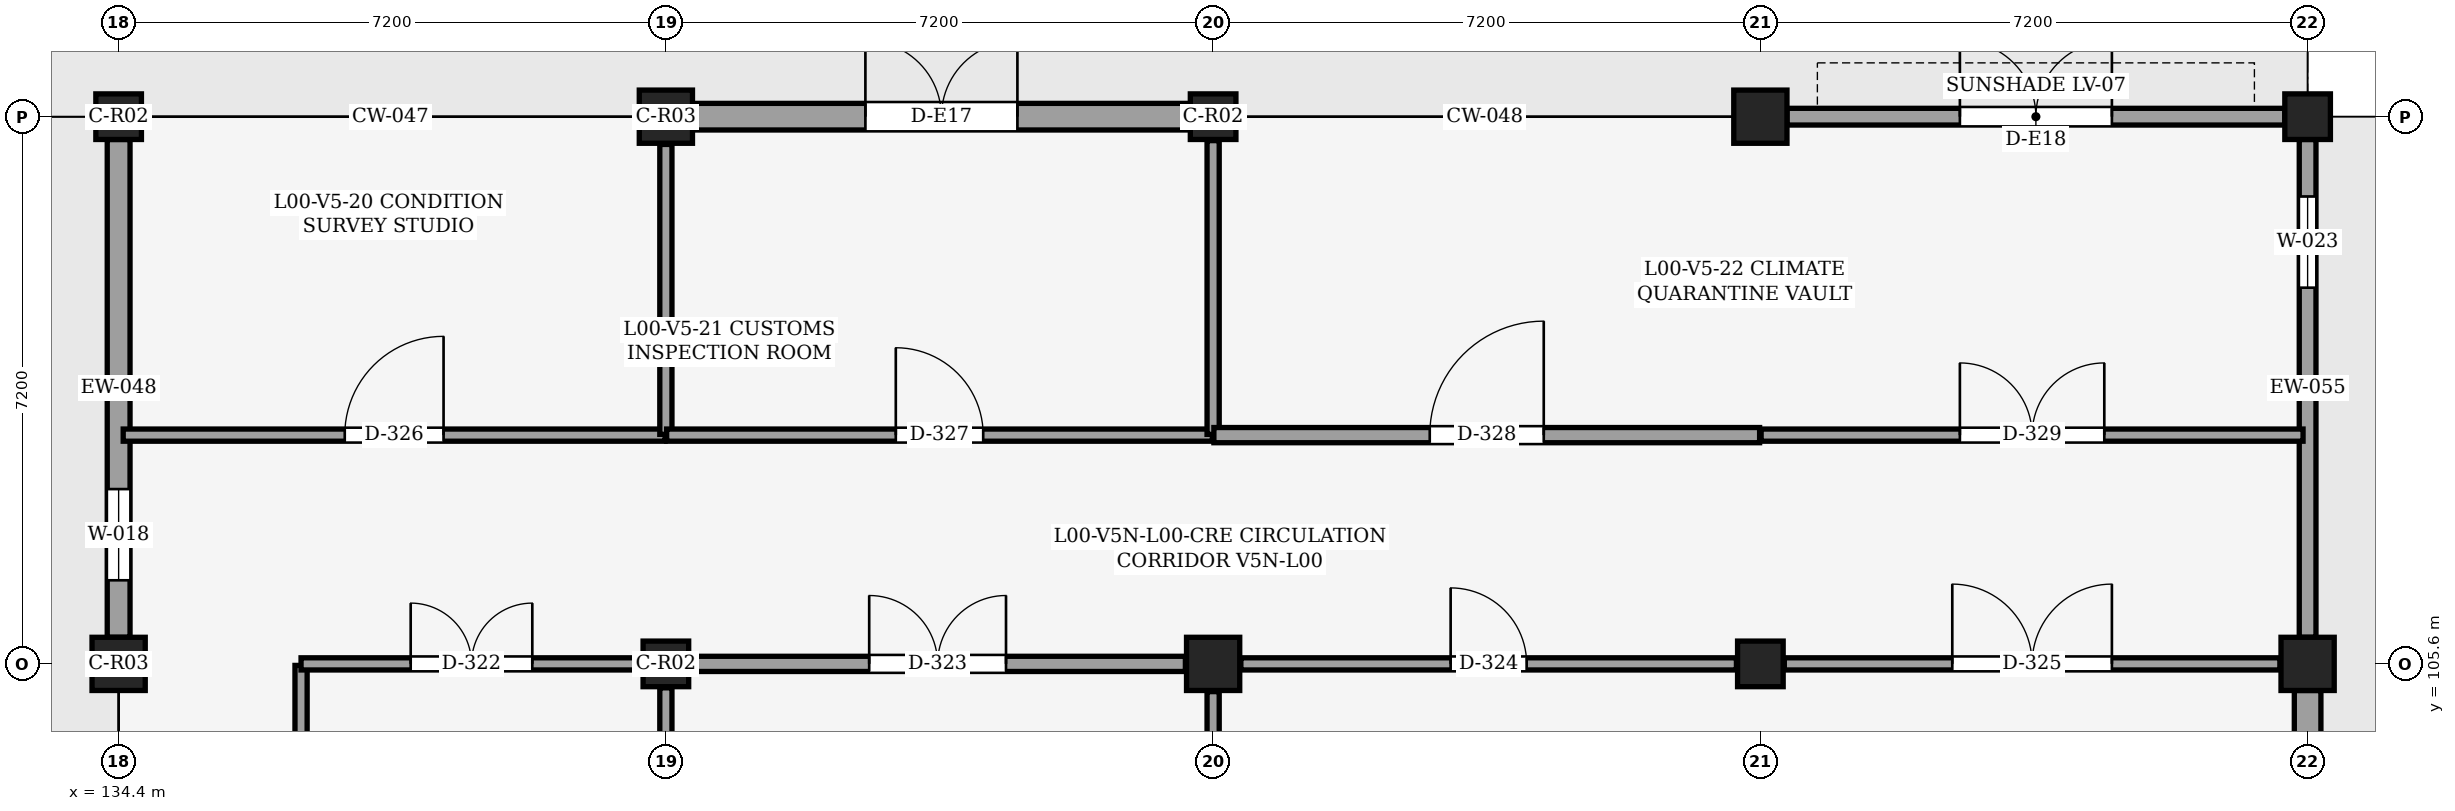
"""IFC4 building model, lengths in metres.
Left out: names, types, materials, properties, quantities, classifications, styles, units other than length and angle.
Written with IfcOpenShell. Run it as: python <this file> out.ifc"""

import sys

from ifc_helpers import new_model, si_unit, direction, frame, frame_2d, origin, origin_2d, place, context, subcontext, project, spatial, rectangle, extrude, element, fill, save


model = new_model("IFC4")
c1 = context("Model", 3, precision=1e-05, world=origin(), true_north=direction((0.0, 1.0)))
c2 = subcontext(c1, "Body", "Model", "MODEL_VIEW")
j1 = project(units=[si_unit("LENGTHUNIT", "METRE"), si_unit("PLANEANGLEUNIT", "RADIAN")], contexts=[c1])
p1 = place(None, origin())
s1 = spatial("IfcSite", under=j1, at=p1, CompositionType="ELEMENT")
p2 = place(p1, origin())
s2 = spatial("IfcBuilding", under=s1, at=p2, CompositionType="ELEMENT")
p3 = place(p2, origin())
s3 = spatial("IfcBuildingStorey", under=s2, at=p3, CompositionType="ELEMENT", Elevation=0.0)
p4 = place(p3, frame((134.4, 105.6, 0.0), z_axis=(0.0, 0.0, 1.0), x_axis=(1.0, 0.0, 0.0)))
e1 = element("IfcColumn", 1, at=p4, inside=s3, PredefinedType="COLUMN", context=c2, shape_type="SweptSolid", body=[
    extrude(rectangle(XDim=0.7, YDim=0.7, at=origin_2d()), origin(), (0.0, 0.0, 1.0), 5.4),
])
for number, where, z_axis, x_axis in (
    (2, (134.4, 112.8, 0.0), (0.0, 0.0, 1.0), (1.0, 0.0, 0.0)),
    (3, (141.6, 105.6, 0.0), (0.0, 0.0, 1.0), (1.0, 0.0, 0.0)),
):
    element("IfcColumn", number, at=place(p3, frame(where, z_axis=z_axis, x_axis=x_axis)), inside=s3, PredefinedType="COLUMN", context=c2, shape_type="SweptSolid", body=[
        extrude(rectangle(XDim=0.6, YDim=0.6, at=origin_2d()), origin(), (0.0, 0.0, 1.0), 5.4),
    ])
for number, where, z_axis, x_axis in (
    (4, (141.6, 112.8, 0.0), (0.0, 0.0, 1.0), (1.0, 0.0, 0.0)),
    (5, (148.8, 105.6, 0.0), (0.0, 0.0, 1.0), (1.0, 0.0, 0.0)),
):
    element("IfcColumn", number, at=place(p3, frame(where, z_axis=z_axis, x_axis=x_axis)), inside=s3, PredefinedType="COLUMN", context=c2, shape_type="SweptSolid", body=[
        extrude(rectangle(XDim=0.7, YDim=0.7, at=origin_2d()), origin(), (0.0, 0.0, 1.0), 5.4),
    ])
for number, where, z_axis, x_axis in (
    (6, (148.8, 112.8, 0.0), (0.0, 0.0, 1.0), (1.0, 0.0, 0.0)),
    (7, (156.0, 105.6, 0.0), (0.0, 0.0, 1.0), (1.0, 0.0, 0.0)),
):
    element("IfcColumn", number, at=place(p3, frame(where, z_axis=z_axis, x_axis=x_axis)), inside=s3, PredefinedType="COLUMN", context=c2, shape_type="SweptSolid", body=[
        extrude(rectangle(XDim=0.6, YDim=0.6, at=origin_2d()), origin(), (0.0, 0.0, 1.0), 5.4),
    ])
for number, where, z_axis, x_axis in (
    (8, (156.0, 112.8, 0.0), (0.0, 0.0, 1.0), (1.0, 0.0, 0.0)),
    (9, (163.2, 105.6, 0.0), (0.0, 0.0, 1.0), (1.0, 0.0, 0.0)),
):
    element("IfcColumn", number, at=place(p3, frame(where, z_axis=z_axis, x_axis=x_axis)), inside=s3, PredefinedType="COLUMN", context=c2, shape_type="SweptSolid", body=[
        extrude(rectangle(XDim=0.7, YDim=0.7, at=origin_2d()), origin(), (0.0, 0.0, 1.0), 5.4),
    ])
p5 = place(p3, frame((163.2, 112.8, 0.0), z_axis=(0.0, 0.0, 1.0), x_axis=(1.0, 0.0, 0.0)))
e10 = element("IfcColumn", 10, at=p5, inside=s3, PredefinedType="COLUMN", context=c2, shape_type="SweptSolid", body=[
    extrude(rectangle(XDim=0.6, YDim=0.6, at=origin_2d()), origin(), (0.0, 0.0, 1.0), 5.4),
])
p6 = place(p3, frame((141.95, 112.8, 0.0), z_axis=(0.0, 0.0, 1.0), x_axis=(1.0, 0.0, 0.0)))
e11 = element("IfcWall", 11, at=p6, inside=s3, PredefinedType="SOLIDWALL", context=c2, shape_type="SweptSolid", body=[
    extrude(rectangle(XDim=6.55, YDim=0.35, at=frame_2d((3.275, 0.0))), origin(), (0.0, 0.0, 1.0), 4.678),
])
p7 = place(p6, frame((2.275, 0.0, 0.0)))
e12 = element("IfcOpeningElement", 12, at=p7, cuts=e11, PredefinedType="OPENING", context=c2, shape_type="SweptSolid", body=[
    extrude(rectangle(XDim=2.0, YDim=2.25, at=frame_2d((1.0, 1.125))), frame((0.0, 0.185, 0.0), z_axis=(0.0, -1.0, 0.0), x_axis=(1.0, 0.0, 0.0)), (0.0, 0.0, 1.0), 0.371),
])
p8 = place(p3, frame((156.35, 112.8, 0.0), z_axis=(0.0, 0.0, 1.0), x_axis=(1.0, 0.0, 0.0)))
e13 = element("IfcWall", 13, at=p8, inside=s3, PredefinedType="SOLIDWALL", context=c2, shape_type="SweptSolid", body=[
    extrude(rectangle(XDim=6.55, YDim=0.22, at=frame_2d((3.275, 0.0))), origin(), (0.0, 0.0, 1.0), 4.591),
])
p9 = place(p8, frame((2.275, 0.0, 0.0)))
e14 = element("IfcOpeningElement", 14, at=p9, cuts=e13, PredefinedType="OPENING", context=c2, shape_type="SweptSolid", body=[
    extrude(rectangle(XDim=2.0, YDim=2.25, at=frame_2d((1.0, 1.125))), frame((0.0, 0.12, 0.0), z_axis=(0.0, -1.0, 0.0), x_axis=(1.0, 0.0, 0.0)), (0.0, 0.0, 1.0), 0.24),
])
p10 = place(p3, frame((134.4, 105.95, 0.0), z_axis=(0.0, 0.0, 1.0), x_axis=(0.0, 1.0, 0.0)))
e15 = element("IfcWall", 15, at=p10, inside=s3, PredefinedType="SOLIDWALL", context=c2, shape_type="SweptSolid", body=[
    extrude(rectangle(XDim=6.55, YDim=0.3, at=frame_2d((3.275, 0.0))), origin(), (0.0, 0.0, 1.0), 4.54),
])
p11 = place(p10, frame((0.75, 0.0, 0.9)))
e16 = element("IfcOpeningElement", 16, at=p11, cuts=e15, PredefinedType="OPENING", context=c2, shape_type="SweptSolid", body=[
    extrude(rectangle(XDim=1.2, YDim=1.5, at=frame_2d((0.6, 0.75))), frame((0.0, 0.16, 0.0), z_axis=(0.0, -1.0, 0.0), x_axis=(1.0, 0.0, 0.0)), (0.0, 0.0, 1.0), 0.321),
])
p12 = place(p3, frame((163.2, 105.25, 0.0), z_axis=(0.0, 0.0, 1.0), x_axis=(0.0, -1.0, 0.0)))
e17 = element("IfcWall", 17, at=p12, inside=s3, PredefinedType="SOLIDWALL", context=c2, shape_type="SweptSolid", body=[
    extrude(rectangle(XDim=6.55, YDim=0.35, at=frame_2d((3.275, 0.0))), origin(), (0.0, 0.0, 1.0), 4.54),
])
p13 = place(p12, frame((0.75, 0.0, 0.9)))
e18 = element("IfcOpeningElement", 18, at=p13, cuts=e17, PredefinedType="OPENING", context=c2, shape_type="SweptSolid", body=[
    extrude(rectangle(XDim=1.2, YDim=1.5, at=frame_2d((0.6, 0.75))), frame((0.0, 0.185, 0.0), z_axis=(0.0, -1.0, 0.0), x_axis=(1.0, 0.0, 0.0)), (0.0, 0.0, 1.0), 0.371),
])
p14 = place(p3, frame((163.2, 112.5, 0.0), z_axis=(0.0, 0.0, 1.0), x_axis=(0.0, -1.0, 0.0)))
e19 = element("IfcWall", 19, at=p14, inside=s3, PredefinedType="SOLIDWALL", context=c2, shape_type="SweptSolid", body=[
    extrude(rectangle(XDim=6.55, YDim=0.22, at=frame_2d((3.275, 0.0))), origin(), (0.0, 0.0, 1.0), 4.54),
])
p15 = place(p14, frame((0.75, 0.0, 0.9)))
e20 = element("IfcOpeningElement", 20, at=p15, cuts=e19, PredefinedType="OPENING", context=c2, shape_type="SweptSolid", body=[
    extrude(rectangle(XDim=1.2, YDim=1.5, at=frame_2d((0.6, 0.75))), frame((0.0, 0.12, 0.0), z_axis=(0.0, -1.0, 0.0), x_axis=(1.0, 0.0, 0.0)), (0.0, 0.0, 1.0), 0.24),
])
p16 = place(p3, frame((136.8, 98.44, 0.0), z_axis=(0.0, 0.0, 1.0), x_axis=(0.0, 1.0, 0.0)))
e21 = element("IfcWall", 21, at=p16, inside=s3, PredefinedType="PARTITIONING", context=c2, shape_type="SweptSolid", body=[
    extrude(rectangle(XDim=7.14, YDim=0.16, at=frame_2d((3.57, 0.0))), origin(), (0.0, 0.0, 1.0), 5.14),
])
p17 = place(p3, frame((136.8, 105.6, 0.0), z_axis=(0.0, 0.0, 1.0), x_axis=(1.0, 0.0, 0.0)))
e22 = element("IfcWall", 22, at=p17, inside=s3, PredefinedType="PARTITIONING", context=c2, shape_type="SweptSolid", body=[
    extrude(rectangle(XDim=4.485, YDim=0.16, at=frame_2d((2.242, 0.0))), origin(), (0.0, 0.0, 1.0), 4.591),
])
p18 = place(p17, frame((1.442, 0.0, 0.0)))
e23 = element("IfcOpeningElement", 23, at=p18, cuts=e22, PredefinedType="OPENING", context=c2, shape_type="SweptSolid", body=[
    extrude(rectangle(XDim=1.6, YDim=2.35, at=frame_2d((0.8, 1.175))), frame((0.0, 0.09, 0.0), z_axis=(0.0, -1.0, 0.0), x_axis=(1.0, 0.0, 0.0)), (0.0, 0.0, 1.0), 0.18),
])
p19 = place(p3, frame((141.6, 98.715, 0.0), z_axis=(0.0, 0.0, 1.0), x_axis=(0.0, 1.0, 0.0)))
e24 = element("IfcWall", 24, at=p19, inside=s3, PredefinedType="PARTITIONING", context=c2, shape_type="SweptSolid", body=[
    extrude(rectangle(XDim=6.57, YDim=0.16, at=frame_2d((3.285, 0.0))), origin(), (0.0, 0.0, 1.0), 4.48),
])
p20 = place(p3, frame((141.915, 105.6, 0.0), z_axis=(0.0, 0.0, 1.0), x_axis=(1.0, 0.0, 0.0)))
e25 = element("IfcWall", 25, at=p20, inside=s3, PredefinedType="PARTITIONING", context=c2, shape_type="SweptSolid", body=[
    extrude(rectangle(XDim=6.52, YDim=0.2, at=frame_2d((3.26, 0.0))), origin(), (0.0, 0.0, 1.0), 4.607),
])
p21 = place(p20, frame((2.36, 0.0, 0.0)))
e26 = element("IfcOpeningElement", 26, at=p21, cuts=e25, PredefinedType="OPENING", context=c2, shape_type="SweptSolid", body=[
    extrude(rectangle(XDim=1.8, YDim=2.4, at=frame_2d((0.9, 1.2))), frame((0.0, 0.11, 0.0), z_axis=(0.0, -1.0, 0.0), x_axis=(1.0, 0.0, 0.0)), (0.0, 0.0, 1.0), 0.22),
])
p22 = place(p3, frame((148.8, 98.765, 0.0), z_axis=(0.0, 0.0, 1.0), x_axis=(0.0, 1.0, 0.0)))
e27 = element("IfcWall", 27, at=p22, inside=s3, PredefinedType="PARTITIONING", context=c2, shape_type="SweptSolid", body=[
    extrude(rectangle(XDim=6.47, YDim=0.16, at=frame_2d((3.235, 0.0))), origin(), (0.0, 0.0, 1.0), 4.38),
])
p23 = place(p3, frame((149.165, 105.6, 0.0), z_axis=(0.0, 0.0, 1.0), x_axis=(1.0, 0.0, 0.0)))
e28 = element("IfcWall", 28, at=p23, inside=s3, PredefinedType="PARTITIONING", context=c2, shape_type="SweptSolid", body=[
    extrude(rectangle(XDim=6.52, YDim=0.16, at=frame_2d((3.26, 0.0))), origin(), (0.0, 0.0, 1.0), 4.678),
])
p24 = place(p23, frame((2.76, 0.0, 0.0)))
e29 = element("IfcOpeningElement", 29, at=p24, cuts=e28, PredefinedType="OPENING", context=c2, shape_type="SweptSolid", body=[
    extrude(rectangle(XDim=1.0, YDim=2.15, at=frame_2d((0.5, 1.075))), frame((0.0, 0.09, 0.0), z_axis=(0.0, -1.0, 0.0), x_axis=(1.0, 0.0, 0.0)), (0.0, 0.0, 1.0), 0.18),
])
p25 = place(p3, frame((156.315, 105.6, 0.0), z_axis=(0.0, 0.0, 1.0), x_axis=(1.0, 0.0, 0.0)))
e30 = element("IfcWall", 30, at=p25, inside=s3, PredefinedType="PARTITIONING", context=c2, shape_type="SweptSolid", body=[
    extrude(rectangle(XDim=6.52, YDim=0.16, at=frame_2d((3.26, 0.0))), origin(), (0.0, 0.0, 1.0), 4.533),
])
p26 = place(p25, frame((2.21, 0.0, 0.0)))
e31 = element("IfcOpeningElement", 31, at=p26, cuts=e30, PredefinedType="OPENING", context=c2, shape_type="SweptSolid", body=[
    extrude(rectangle(XDim=2.1, YDim=2.5, at=frame_2d((1.05, 1.25))), frame((0.0, 0.09, 0.0), z_axis=(0.0, -1.0, 0.0), x_axis=(1.0, 0.0, 0.0)), (0.0, 0.0, 1.0), 0.18),
])
p27 = place(p3, frame((134.46, 108.61, 0.0), z_axis=(0.0, 0.0, 1.0), x_axis=(1.0, 0.0, 0.0)))
e32 = element("IfcWall", 32, at=p27, inside=s3, PredefinedType="PARTITIONING", context=c2, shape_type="SweptSolid", body=[
    extrude(rectangle(XDim=7.13, YDim=0.16, at=frame_2d((3.565, 0.0))), origin(), (0.0, 0.0, 1.0), 5.14),
])
p28 = place(p27, frame((2.915, 0.0, 0.0)))
e33 = element("IfcOpeningElement", 33, at=p28, cuts=e32, PredefinedType="OPENING", context=c2, shape_type="SweptSolid", body=[
    extrude(rectangle(XDim=1.3, YDim=2.2, at=frame_2d((0.65, 1.1))), frame((0.0, 0.09, 0.0), z_axis=(0.0, -1.0, 0.0), x_axis=(1.0, 0.0, 0.0)), (0.0, 0.0, 1.0), 0.18),
])
p29 = place(p3, frame((141.6, 108.62, 0.0), z_axis=(0.0, 0.0, 1.0), x_axis=(0.0, 1.0, 0.0)))
e34 = element("IfcWall", 34, at=p29, inside=s3, PredefinedType="PARTITIONING", context=c2, shape_type="SweptSolid", body=[
    extrude(rectangle(XDim=3.815, YDim=0.16, at=frame_2d((1.907, 0.0))), origin(), (0.0, 0.0, 1.0), 4.44),
])
p30 = place(p3, frame((141.61, 108.61, 0.0), z_axis=(0.0, 0.0, 1.0), x_axis=(1.0, 0.0, 0.0)))
e35 = element("IfcWall", 35, at=p30, inside=s3, PredefinedType="PARTITIONING", context=c2, shape_type="SweptSolid", body=[
    extrude(rectangle(XDim=7.18, YDim=0.16, at=frame_2d((3.59, 0.0))), origin(), (0.0, 0.0, 1.0), 5.14),
])
p31 = place(p30, frame((3.015, 0.0, 0.0)))
e36 = element("IfcOpeningElement", 36, at=p31, cuts=e35, PredefinedType="OPENING", context=c2, shape_type="SweptSolid", body=[
    extrude(rectangle(XDim=1.15, YDim=2.2, at=frame_2d((0.575, 1.1))), frame((0.0, 0.09, 0.0), z_axis=(0.0, -1.0, 0.0), x_axis=(1.0, 0.0, 0.0)), (0.0, 0.0, 1.0), 0.18),
])
p32 = place(p3, frame((148.8, 108.62, 0.0), z_axis=(0.0, 0.0, 1.0), x_axis=(0.0, 1.0, 0.0)))
e37 = element("IfcWall", 37, at=p32, inside=s3, PredefinedType="PARTITIONING", context=c2, shape_type="SweptSolid", body=[
    extrude(rectangle(XDim=3.865, YDim=0.16, at=frame_2d((1.933, 0.0))), origin(), (0.0, 0.0, 1.0), 4.29),
])
p33 = place(p3, frame((148.81, 108.61, 0.0), z_axis=(0.0, 0.0, 1.0), x_axis=(1.0, 0.0, 0.0)))
e38 = element("IfcWall", 38, at=p33, inside=s3, PredefinedType="PARTITIONING", context=c2, shape_type="SweptSolid", body=[
    extrude(rectangle(XDim=7.18, YDim=0.2, at=frame_2d((3.59, 0.0))), origin(), (0.0, 0.0, 1.0), 5.14),
])
p34 = place(p33, frame((2.84, 0.0, 0.0)))
e39 = element("IfcOpeningElement", 39, at=p34, cuts=e38, PredefinedType="OPENING", context=c2, shape_type="SweptSolid", body=[
    extrude(rectangle(XDim=1.5, YDim=2.2, at=frame_2d((0.75, 1.1))), frame((0.0, 0.11, 0.0), z_axis=(0.0, -1.0, 0.0), x_axis=(1.0, 0.0, 0.0)), (0.0, 0.0, 1.0), 0.22),
])
p35 = place(p3, frame((156.01, 108.61, 0.0), z_axis=(0.0, 0.0, 1.0), x_axis=(1.0, 0.0, 0.0)))
e40 = element("IfcWall", 40, at=p35, inside=s3, PredefinedType="PARTITIONING", context=c2, shape_type="SweptSolid", body=[
    extrude(rectangle(XDim=7.13, YDim=0.16, at=frame_2d((3.565, 0.0))), origin(), (0.0, 0.0, 1.0), 5.14),
])
p36 = place(p35, frame((2.615, 0.0, 0.0)))
e41 = element("IfcOpeningElement", 41, at=p36, cuts=e40, PredefinedType="OPENING", context=c2, shape_type="SweptSolid", body=[
    extrude(rectangle(XDim=1.9, YDim=2.45, at=frame_2d((0.95, 1.225))), frame((0.0, 0.09, 0.0), z_axis=(0.0, -1.0, 0.0), x_axis=(1.0, 0.0, 0.0)), (0.0, 0.0, 1.0), 0.18),
])
p37 = place(p7, origin())
e42 = element("IfcDoor", 42, at=p37, inside=s3, OperationType="DOUBLE_DOOR_SINGLE_SWING", PredefinedType="DOOR", context=c2, shape_type="SweptSolid", body=[
    extrude(rectangle(XDim=2.0, YDim=2.25, at=frame_2d((1.0, 1.125))), frame((0.0, 0.025, 0.0), z_axis=(0.0, -1.0, 0.0), x_axis=(1.0, 0.0, 0.0)), (0.0, 0.0, 1.0), 0.05),
])
fill(e12, e42)
p38 = place(p9, origin())
e43 = element("IfcDoor", 43, at=p38, inside=s3, OperationType="DOUBLE_DOOR_SINGLE_SWING", PredefinedType="DOOR", context=c2, shape_type="SweptSolid", body=[
    extrude(rectangle(XDim=2.0, YDim=2.25, at=frame_2d((1.0, 1.125))), frame((0.0, 0.025, 0.0), z_axis=(0.0, -1.0, 0.0), x_axis=(1.0, 0.0, 0.0)), (0.0, 0.0, 1.0), 0.05),
])
fill(e14, e43)
p39 = place(p11, origin())
e44 = element("IfcWindow", 44, at=p39, inside=s3, PartitioningType="SINGLE_PANEL", PredefinedType="WINDOW", context=c2, shape_type="SweptSolid", body=[
    extrude(rectangle(XDim=1.2, YDim=1.5, at=frame_2d((0.6, 0.75))), frame((0.0, 0.03, 0.0), z_axis=(0.0, -1.0, 0.0), x_axis=(1.0, 0.0, 0.0)), (0.0, 0.0, 1.0), 0.06),
])
fill(e16, e44)
p40 = place(p15, origin())
e45 = element("IfcWindow", 45, at=p40, inside=s3, PartitioningType="SINGLE_PANEL", PredefinedType="WINDOW", context=c2, shape_type="SweptSolid", body=[
    extrude(rectangle(XDim=1.2, YDim=1.5, at=frame_2d((0.6, 0.75))), frame((0.0, 0.03, 0.0), z_axis=(0.0, -1.0, 0.0), x_axis=(1.0, 0.0, 0.0)), (0.0, 0.0, 1.0), 0.06),
])
fill(e20, e45)
p41 = place(p18, origin())
e46 = element("IfcDoor", 46, at=p41, inside=s3, OperationType="DOUBLE_DOOR_SINGLE_SWING", PredefinedType="DOOR", context=c2, shape_type="SweptSolid", body=[
    extrude(rectangle(XDim=1.6, YDim=2.35, at=frame_2d((0.8, 1.175))), frame((0.0, 0.025, 0.0), z_axis=(0.0, -1.0, 0.0), x_axis=(1.0, 0.0, 0.0)), (0.0, 0.0, 1.0), 0.05),
])
fill(e23, e46)
p42 = place(p21, origin())
e47 = element("IfcDoor", 47, at=p42, inside=s3, OperationType="DOUBLE_DOOR_SINGLE_SWING", PredefinedType="DOOR", context=c2, shape_type="SweptSolid", body=[
    extrude(rectangle(XDim=1.8, YDim=2.4, at=frame_2d((0.9, 1.2))), frame((0.0, 0.025, 0.0), z_axis=(0.0, -1.0, 0.0), x_axis=(1.0, 0.0, 0.0)), (0.0, 0.0, 1.0), 0.05),
])
fill(e26, e47)
p43 = place(p24, origin())
e48 = element("IfcDoor", 48, at=p43, inside=s3, OperationType="SINGLE_SWING_LEFT", PredefinedType="DOOR", context=c2, shape_type="SweptSolid", body=[
    extrude(rectangle(XDim=1.0, YDim=2.15, at=frame_2d((0.5, 1.075))), frame((0.0, 0.025, 0.0), z_axis=(0.0, -1.0, 0.0), x_axis=(1.0, 0.0, 0.0)), (0.0, 0.0, 1.0), 0.05),
])
fill(e29, e48)
p44 = place(p26, origin())
e49 = element("IfcDoor", 49, at=p44, inside=s3, OperationType="DOUBLE_DOOR_SINGLE_SWING", PredefinedType="DOOR", context=c2, shape_type="SweptSolid", body=[
    extrude(rectangle(XDim=2.1, YDim=2.5, at=frame_2d((1.05, 1.25))), frame((0.0, 0.025, 0.0), z_axis=(0.0, -1.0, 0.0), x_axis=(1.0, 0.0, 0.0)), (0.0, 0.0, 1.0), 0.05),
])
fill(e31, e49)
p45 = place(p28, origin())
e50 = element("IfcDoor", 50, at=p45, inside=s3, OperationType="SINGLE_SWING_RIGHT", PredefinedType="DOOR", context=c2, shape_type="SweptSolid", body=[
    extrude(rectangle(XDim=1.3, YDim=2.2, at=frame_2d((0.65, 1.1))), frame((0.0, 0.025, 0.0), z_axis=(0.0, -1.0, 0.0), x_axis=(1.0, 0.0, 0.0)), (0.0, 0.0, 1.0), 0.05),
])
fill(e33, e50)
p46 = place(p31, origin())
e51 = element("IfcDoor", 51, at=p46, inside=s3, OperationType="SINGLE_SWING_LEFT", PredefinedType="DOOR", context=c2, shape_type="SweptSolid", body=[
    extrude(rectangle(XDim=1.15, YDim=2.2, at=frame_2d((0.575, 1.1))), frame((0.0, 0.025, 0.0), z_axis=(0.0, -1.0, 0.0), x_axis=(1.0, 0.0, 0.0)), (0.0, 0.0, 1.0), 0.05),
])
fill(e36, e51)
p47 = place(p34, origin())
e52 = element("IfcDoor", 52, at=p47, inside=s3, OperationType="SINGLE_SWING_RIGHT", PredefinedType="DOOR", context=c2, shape_type="SweptSolid", body=[
    extrude(rectangle(XDim=1.5, YDim=2.2, at=frame_2d((0.75, 1.1))), frame((0.0, 0.025, 0.0), z_axis=(0.0, -1.0, 0.0), x_axis=(1.0, 0.0, 0.0)), (0.0, 0.0, 1.0), 0.05),
])
fill(e39, e52)
p48 = place(p36, origin())
e53 = element("IfcDoor", 53, at=p48, inside=s3, OperationType="DOUBLE_DOOR_SINGLE_SWING", PredefinedType="DOOR", context=c2, shape_type="SweptSolid", body=[
    extrude(rectangle(XDim=1.9, YDim=2.45, at=frame_2d((0.95, 1.225))), frame((0.0, 0.025, 0.0), z_axis=(0.0, -1.0, 0.0), x_axis=(1.0, 0.0, 0.0)), (0.0, 0.0, 1.0), 0.05),
])
fill(e41, e53)
save(model, sys.argv[1])
